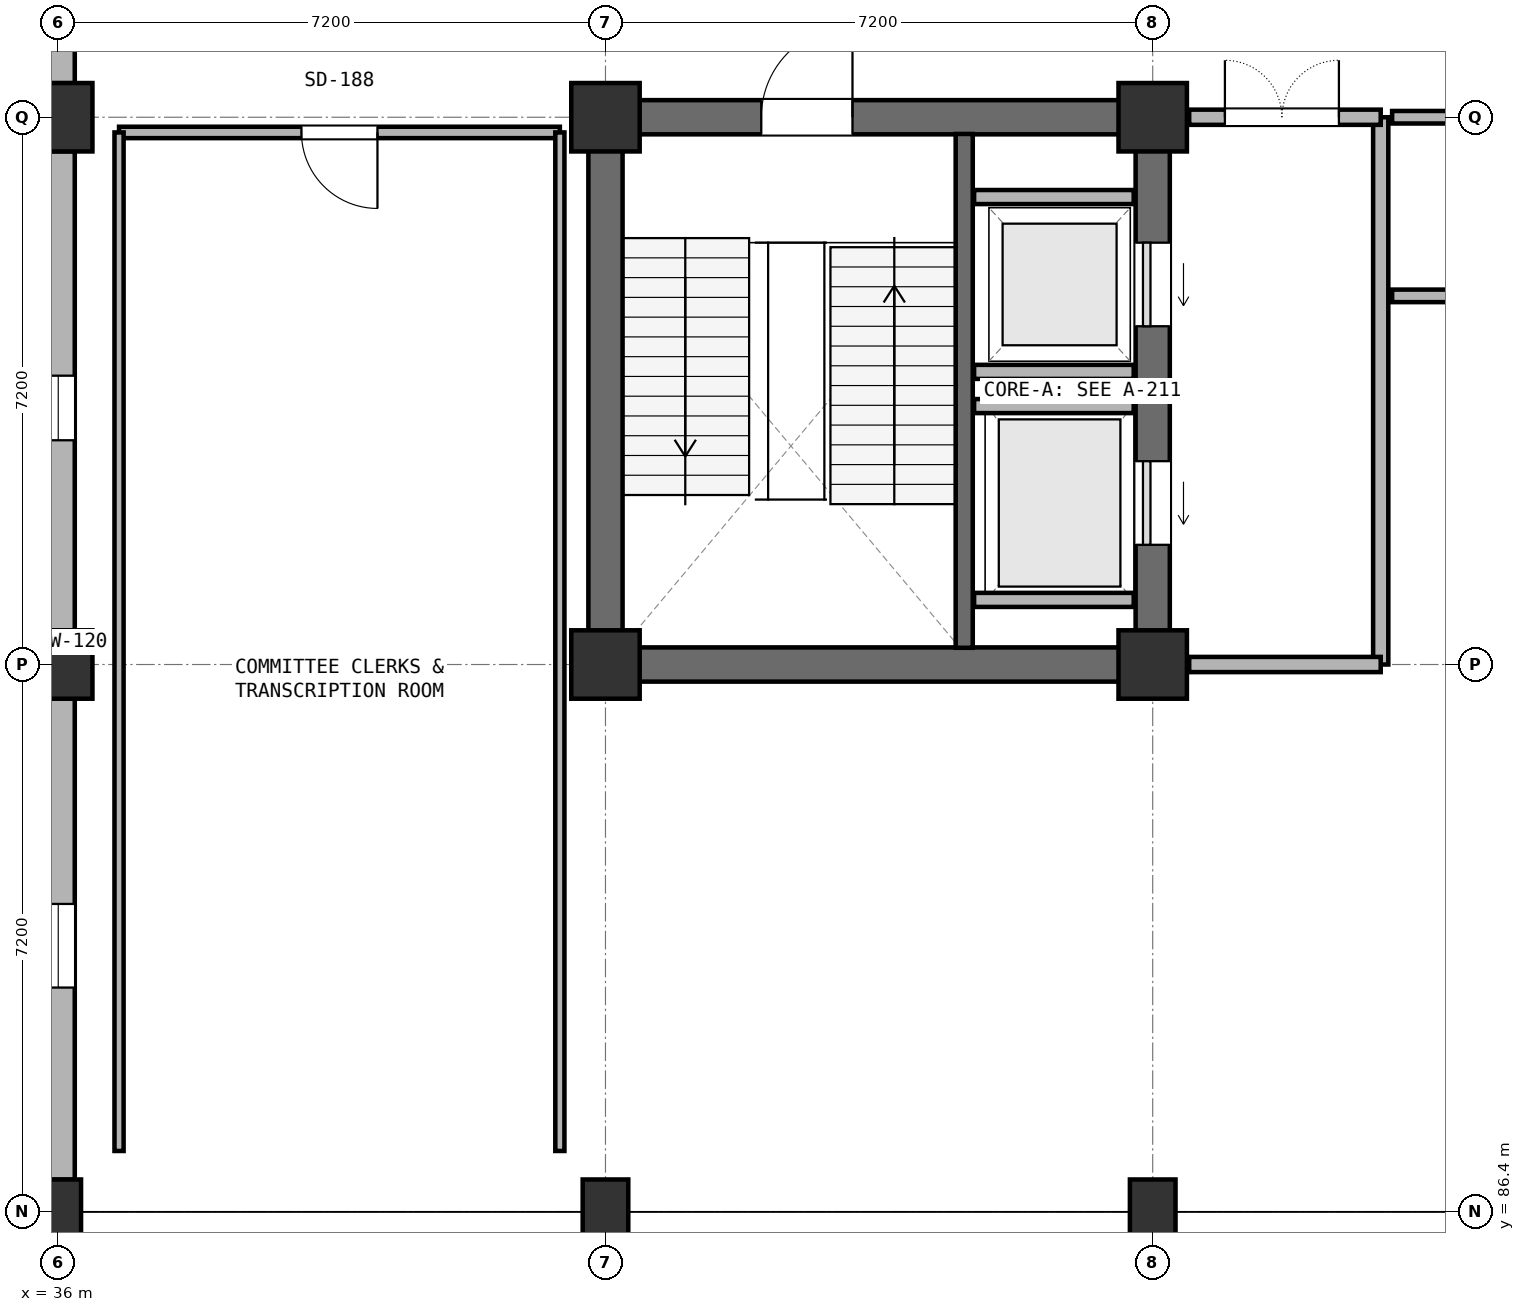
"""IFC4 building model, lengths in metres.
Left out: names, types, materials, properties, quantities, classifications, styles, units other than length and angle.
Written with IfcOpenShell. Run it as: python <this file> out.ifc"""

import sys

from ifc_helpers import new_model, si_unit, direction, frame, frame_2d, origin, origin_2d, place, context, subcontext, project, spatial, rectangle, extrude, element, fill, save


model = new_model("IFC4")
c1 = context("Model", 3, precision=1e-05, world=origin(), true_north=direction((0.0, 1.0)))
c2 = subcontext(c1, "Body", "Model", "MODEL_VIEW")
j1 = project(units=[si_unit("LENGTHUNIT", "METRE"), si_unit("PLANEANGLEUNIT", "RADIAN")], contexts=[c1])
p1 = place(None, origin())
s1 = spatial("IfcSite", under=j1, at=p1, CompositionType="ELEMENT")
p2 = place(p1, origin())
s2 = spatial("IfcBuilding", under=s1, at=p2, CompositionType="ELEMENT")
p3 = place(p2, frame((0.0, 0.0, 5.4)))
s3 = spatial("IfcBuildingStorey", under=s2, at=p3, CompositionType="ELEMENT", Elevation=5.4)
p4 = place(p3, frame((36.0, 86.4, 0.0), z_axis=(0.0, 0.0, 1.0), x_axis=(1.0, 0.0, 0.0)))
e1 = element("IfcColumn", 1, at=p4, inside=s3, PredefinedType="COLUMN", context=c2, shape_type="SweptSolid", body=[
    extrude(rectangle(XDim=0.6, YDim=0.85, at=origin_2d()), origin(), (0.0, 0.0, 1.0), 4.8),
])
for number, where, z_axis, x_axis in (
    (2, (36.0, 93.6, 0.0), (0.0, 0.0, 1.0), (1.0, 0.0, 0.0)),
    (3, (36.0, 100.8, 0.0), (0.0, 0.0, 1.0), (1.0, 0.0, 0.0)),
):
    element("IfcColumn", number, at=place(p3, frame(where, z_axis=z_axis, x_axis=x_axis)), inside=s3, PredefinedType="COLUMN", context=c2, shape_type="SweptSolid", body=[
        extrude(rectangle(XDim=0.9, YDim=0.9, at=origin_2d()), origin(), (0.0, 0.0, 1.0), 4.8),
    ])
p5 = place(p3, frame((43.2, 86.4, 0.0), z_axis=(0.0, 0.0, 1.0), x_axis=(1.0, 0.0, 0.0)))
e4 = element("IfcColumn", 4, at=p5, inside=s3, PredefinedType="COLUMN", context=c2, shape_type="SweptSolid", body=[
    extrude(rectangle(XDim=0.6, YDim=0.85, at=origin_2d()), origin(), (0.0, 0.0, 1.0), 4.8),
])
for number, where, z_axis, x_axis in (
    (5, (43.2, 93.6, 0.0), (0.0, 0.0, 1.0), (1.0, 0.0, 0.0)),
    (6, (43.2, 100.8, 0.0), (0.0, 0.0, 1.0), (1.0, 0.0, 0.0)),
):
    element("IfcColumn", number, at=place(p3, frame(where, z_axis=z_axis, x_axis=x_axis)), inside=s3, PredefinedType="COLUMN", context=c2, shape_type="SweptSolid", body=[
        extrude(rectangle(XDim=0.9, YDim=0.9, at=origin_2d()), origin(), (0.0, 0.0, 1.0), 4.8),
    ])
p6 = place(p3, frame((50.4, 86.4, 0.0), z_axis=(0.0, 0.0, 1.0), x_axis=(1.0, 0.0, 0.0)))
e7 = element("IfcColumn", 7, at=p6, inside=s3, PredefinedType="COLUMN", context=c2, shape_type="SweptSolid", body=[
    extrude(rectangle(XDim=0.6, YDim=0.85, at=origin_2d()), origin(), (0.0, 0.0, 1.0), 4.8),
])
for number, where, z_axis, x_axis in (
    (8, (50.4, 93.6, 0.0), (0.0, 0.0, 1.0), (1.0, 0.0, 0.0)),
    (9, (50.4, 100.8, 0.0), (0.0, 0.0, 1.0), (1.0, 0.0, 0.0)),
):
    element("IfcColumn", number, at=place(p3, frame(where, z_axis=z_axis, x_axis=x_axis)), inside=s3, PredefinedType="COLUMN", context=c2, shape_type="SweptSolid", body=[
        extrude(rectangle(XDim=0.9, YDim=0.9, at=origin_2d()), origin(), (0.0, 0.0, 1.0), 4.8),
    ])
p7 = place(p3, frame((43.55, 93.6, 0.0), z_axis=(0.0, 0.0, 1.0), x_axis=(1.0, 0.0, 0.0)))
e10 = element("IfcWall", 10, at=p7, inside=s3, PredefinedType="SHEAR", context=c2, shape_type="SweptSolid", body=[
    extrude(rectangle(XDim=6.5, YDim=0.45, at=frame_2d((3.25, 0.0))), origin(), (0.0, 0.0, 1.0), 4.8),
])
p8 = place(p3, frame((50.4, 93.95, 0.0), z_axis=(0.0, 0.0, 1.0), x_axis=(0.0, 1.0, 0.0)))
e11 = element("IfcWall", 11, at=p8, inside=s3, PredefinedType="SHEAR", context=c2, shape_type="SweptSolid", body=[
    extrude(rectangle(XDim=6.5, YDim=0.45, at=frame_2d((3.25, 0.0))), origin(), (0.0, 0.0, 1.0), 4.8),
])
p9 = place(p8, frame((1.225, 0.0, 0.0)))
e12 = element("IfcOpeningElement", 12, at=p9, cuts=e11, PredefinedType="OPENING", context=c2, shape_type="SweptSolid", body=[
    extrude(rectangle(XDim=1.1, YDim=2.2, at=frame_2d((0.55, 1.1))), frame((0.0, 0.235, 0.0), z_axis=(0.0, -1.0, 0.0), x_axis=(1.0, 0.0, 0.0)), (0.0, 0.0, 1.0), 0.47),
])
p10 = place(p8, frame((4.1, 0.0, 0.0)))
e13 = element("IfcOpeningElement", 13, at=p10, cuts=e11, PredefinedType="OPENING", context=c2, shape_type="SweptSolid", body=[
    extrude(rectangle(XDim=1.1, YDim=2.2, at=frame_2d((0.55, 1.1))), frame((0.0, 0.235, 0.0), z_axis=(0.0, -1.0, 0.0), x_axis=(1.0, 0.0, 0.0)), (0.0, 0.0, 1.0), 0.47),
])
p11 = place(p3, frame((50.05, 100.8, 0.0), z_axis=(0.0, 0.0, 1.0), x_axis=(-1.0, 0.0, 0.0)))
e14 = element("IfcWall", 14, at=p11, inside=s3, PredefinedType="SHEAR", context=c2, shape_type="SweptSolid", body=[
    extrude(rectangle(XDim=6.5, YDim=0.45, at=frame_2d((3.25, 0.0))), origin(), (0.0, 0.0, 1.0), 4.8),
])
p12 = place(p11, frame((3.6, 0.0, 0.0)))
e15 = element("IfcOpeningElement", 15, at=p12, cuts=e14, PredefinedType="OPENING", context=c2, shape_type="SweptSolid", body=[
    extrude(rectangle(XDim=1.2, YDim=2.2, at=frame_2d((0.6, 1.1))), frame((0.0, 0.235, 0.0), z_axis=(0.0, -1.0, 0.0), x_axis=(1.0, 0.0, 0.0)), (0.0, 0.0, 1.0), 0.47),
])
p13 = place(p3, frame((43.2, 100.45, 0.0), z_axis=(0.0, 0.0, 1.0), x_axis=(0.0, -1.0, 0.0)))
e16 = element("IfcWall", 16, at=p13, inside=s3, PredefinedType="SHEAR", context=c2, shape_type="SweptSolid", body=[
    extrude(rectangle(XDim=6.5, YDim=0.45, at=frame_2d((3.25, 0.0))), origin(), (0.0, 0.0, 1.0), 4.8),
])
p14 = place(p3, frame((47.92, 93.82, 0.0), z_axis=(0.0, 0.0, 1.0), x_axis=(0.0, 1.0, 0.0)))
e17 = element("IfcWall", 17, at=p14, inside=s3, PredefinedType="SHEAR", context=c2, shape_type="SweptSolid", body=[
    extrude(rectangle(XDim=6.76, YDim=0.225, at=frame_2d((3.38, 0.0))), origin(), (0.0, 0.0, 1.0), 4.8),
])
for number, where, z_axis, x_axis in (
    (18, (48.05, 94.45, 0.0), (0.0, 0.0, 1.0), (1.0, 0.0, 0.0)),
    (19, (48.05, 97.0, 0.0), (0.0, 0.0, 1.0), (1.0, 0.0, 0.0)),
    (20, (48.05, 97.45, 0.0), (0.0, 0.0, 1.0), (1.0, 0.0, 0.0)),
    (21, (48.05, 99.75, 0.0), (0.0, 0.0, 1.0), (1.0, 0.0, 0.0)),
):
    element("IfcWall", number, at=place(p3, frame(where, z_axis=z_axis, x_axis=x_axis)), inside=s3, PredefinedType="PARTITIONING", context=c2, shape_type="SweptSolid", body=[
        extrude(rectangle(XDim=2.1, YDim=0.185, at=frame_2d((1.05, 0.0))), origin(), (0.0, 0.0, 1.0), 4.8),
    ])
p15 = place(p3, frame((36.0, 86.823, 0.0), z_axis=(0.0, 0.0, 1.0), x_axis=(0.0, 1.0, 0.0)))
e22 = element("IfcWall", 22, at=p15, inside=s3, PredefinedType="SOLIDWALL", context=c2, shape_type="SweptSolid", body=[
    extrude(rectangle(XDim=6.329, YDim=0.435, at=frame_2d((3.165, 0.0))), origin(), (0.0, 0.0, 1.0), 3.5),
])
p16 = place(p15, frame((2.527, 0.0, 0.7)))
e23 = element("IfcOpeningElement", 23, at=p16, cuts=e22, PredefinedType="OPENING", context=c2, shape_type="SweptSolid", body=[
    extrude(rectangle(XDim=1.1, YDim=2.35, at=frame_2d((0.55, 1.175))), frame((0.0, 0.228, 0.0), z_axis=(0.0, -1.0, 0.0), x_axis=(1.0, 0.0, 0.0)), (0.0, 0.0, 1.0), 0.455),
])
p17 = place(p3, frame((36.0, 94.048, 0.0), z_axis=(0.0, 0.0, 1.0), x_axis=(0.0, 1.0, 0.0)))
e24 = element("IfcWall", 24, at=p17, inside=s3, PredefinedType="SOLIDWALL", context=c2, shape_type="SweptSolid", body=[
    extrude(rectangle(XDim=6.304, YDim=0.435, at=frame_2d((3.152, 0.0))), origin(), (0.0, 0.0, 1.0), 3.5),
])
p18 = place(p17, frame((2.502, 0.0, 0.7)))
e25 = element("IfcOpeningElement", 25, at=p18, cuts=e24, PredefinedType="OPENING", context=c2, shape_type="SweptSolid", body=[
    extrude(rectangle(XDim=0.85, YDim=2.2, at=frame_2d((0.425, 1.1))), frame((0.0, 0.228, 0.0), z_axis=(0.0, -1.0, 0.0), x_axis=(1.0, 0.0, 0.0)), (0.0, 0.0, 1.0), 0.455),
])
p19 = place(p3, frame((36.0, 101.248, 0.0), z_axis=(0.0, 0.0, 1.0), x_axis=(0.0, 1.0, 0.0)))
e26 = element("IfcWall", 26, at=p19, inside=s3, PredefinedType="SOLIDWALL", context=c2, shape_type="SweptSolid", body=[
    extrude(rectangle(XDim=6.304, YDim=0.435, at=frame_2d((3.152, 0.0))), origin(), (0.0, 0.0, 1.0), 3.5),
])
p20 = place(p19, frame((2.502, 0.0, 0.7)))
e27 = element("IfcOpeningElement", 27, at=p20, cuts=e26, PredefinedType="OPENING", context=c2, shape_type="SweptSolid", body=[
    extrude(rectangle(XDim=1.1, YDim=2.35, at=frame_2d((0.55, 1.175))), frame((0.0, 0.228, 0.0), z_axis=(0.0, -1.0, 0.0), x_axis=(1.0, 0.0, 0.0)), (0.0, 0.0, 1.0), 0.455),
])
p21 = place(p3, frame((53.4, 93.6, 0.0), z_axis=(0.0, 0.0, 1.0), x_axis=(0.0, 1.0, 0.0)))
e28 = element("IfcWall", 28, at=p21, inside=s3, PredefinedType="PARTITIONING", context=c2, shape_type="SweptSolid", body=[
    extrude(rectangle(XDim=7.2, YDim=0.2, at=frame_2d((3.6, 0.0))), origin(), (0.0, 0.0, 1.0), 3.52),
])
p22 = place(p3, frame((50.88, 93.6, 0.0), z_axis=(0.0, 0.0, 1.0), x_axis=(1.0, 0.0, 0.0)))
e29 = element("IfcWall", 29, at=p22, inside=s3, PredefinedType="PARTITIONING", context=c2, shape_type="SweptSolid", body=[
    extrude(rectangle(XDim=2.52, YDim=0.2, at=frame_2d((1.26, 0.0))), origin(), (0.0, 0.0, 1.0), 3.52),
])
p23 = place(p3, frame((53.4, 100.8, 0.0), z_axis=(0.0, 0.0, 1.0), x_axis=(-1.0, 0.0, 0.0)))
e30 = element("IfcWall", 30, at=p23, inside=s3, PredefinedType="PARTITIONING", context=c2, shape_type="SweptSolid", body=[
    extrude(rectangle(XDim=2.52, YDim=0.2, at=frame_2d((1.26, 0.0))), origin(), (0.0, 0.0, 1.0), 3.52),
])
p24 = place(p23, frame((0.55, 0.0, 0.0)))
e31 = element("IfcOpeningElement", 31, at=p24, cuts=e30, PredefinedType="OPENING", context=c2, shape_type="SweptSolid", body=[
    extrude(rectangle(XDim=1.5, YDim=2.2, at=frame_2d((0.75, 1.1))), frame((0.0, 0.11, 0.0), z_axis=(0.0, -1.0, 0.0), x_axis=(1.0, 0.0, 0.0)), (0.0, 0.0, 1.0), 0.22),
])
p25 = place(p3, frame((56.75, 100.8, 0.0), z_axis=(0.0, 0.0, 1.0), x_axis=(-1.0, 0.0, 0.0)))
e32 = element("IfcWall", 32, at=p25, inside=s3, PredefinedType="PARTITIONING", context=c2, shape_type="SweptSolid", body=[
    extrude(rectangle(XDim=3.2, YDim=0.165, at=frame_2d((1.6, 0.0))), origin(), (0.0, 0.0, 1.0), 3.52),
])
p26 = place(p25, frame((0.95, 0.0, 0.0)))
e33 = element("IfcOpeningElement", 33, at=p26, cuts=e32, PredefinedType="OPENING", context=c2, shape_type="SweptSolid", body=[
    extrude(rectangle(XDim=0.95, YDim=2.15, at=frame_2d((0.475, 1.075))), frame((0.0, 0.093, 0.0), z_axis=(0.0, -1.0, 0.0), x_axis=(1.0, 0.0, 0.0)), (0.0, 0.0, 1.0), 0.185),
])
p27 = place(p3, frame((53.55, 98.45, 0.0), z_axis=(0.0, 0.0, 1.0), x_axis=(1.0, 0.0, 0.0)))
e34 = element("IfcWall", 34, at=p27, inside=s3, PredefinedType="PARTITIONING", context=c2, shape_type="SweptSolid", body=[
    extrude(rectangle(XDim=3.2, YDim=0.165, at=frame_2d((1.6, 0.0))), origin(), (0.0, 0.0, 1.0), 3.52),
])
p28 = place(p3, frame((42.6, 100.6, 0.0), z_axis=(0.0, 0.0, 1.0), x_axis=(-1.0, 0.0, 0.0)))
e35 = element("IfcWall", 35, at=p28, inside=s3, PredefinedType="PARTITIONING", context=c2, shape_type="SweptSolid", body=[
    extrude(rectangle(XDim=5.8, YDim=0.15, at=frame_2d((2.9, 0.0))), origin(), (0.0, 0.0, 1.0), 3.52),
])
p29 = place(p28, frame((2.4, 0.0, 0.0)))
e36 = element("IfcOpeningElement", 36, at=p29, cuts=e35, PredefinedType="OPENING", context=c2, shape_type="SweptSolid", body=[
    extrude(rectangle(XDim=1.0, YDim=2.15, at=frame_2d((0.5, 1.075))), frame((0.0, 0.085, 0.0), z_axis=(0.0, -1.0, 0.0), x_axis=(1.0, 0.0, 0.0)), (0.0, 0.0, 1.0), 0.17),
])
for number, where, z_axis, x_axis in (
    (37, (36.8, 87.2, 0.0), (0.0, 0.0, 1.0), (0.0, 1.0, 0.0)),
    (38, (42.6, 100.6, 0.0), (0.0, 0.0, 1.0), (0.0, -1.0, 0.0)),
):
    element("IfcWall", number, at=place(p3, frame(where, z_axis=z_axis, x_axis=x_axis)), inside=s3, PredefinedType="PARTITIONING", context=c2, shape_type="SweptSolid", body=[
        extrude(rectangle(XDim=13.4, YDim=0.12, at=frame_2d((6.7, 0.0))), origin(), (0.0, 0.0, 1.0), 3.52),
    ])
p30 = place(p9, origin())
e39 = element("IfcDoor", 39, at=p30, inside=s3, OperationType="SLIDING_TO_LEFT", PredefinedType="DOOR", context=c2, shape_type="SweptSolid", body=[
    extrude(rectangle(XDim=1.1, YDim=2.2, at=frame_2d((0.55, 1.1))), frame((0.0, 0.025, 0.0), z_axis=(0.0, -1.0, 0.0), x_axis=(1.0, 0.0, 0.0)), (0.0, 0.0, 1.0), 0.05),
])
fill(e12, e39)
p31 = place(p10, origin())
e40 = element("IfcDoor", 40, at=p31, inside=s3, OperationType="SLIDING_TO_LEFT", PredefinedType="DOOR", context=c2, shape_type="SweptSolid", body=[
    extrude(rectangle(XDim=1.1, YDim=2.2, at=frame_2d((0.55, 1.1))), frame((0.0, 0.025, 0.0), z_axis=(0.0, -1.0, 0.0), x_axis=(1.0, 0.0, 0.0)), (0.0, 0.0, 1.0), 0.05),
])
fill(e13, e40)
p32 = place(p16, origin())
e41 = element("IfcWindow", 41, at=p32, inside=s3, PartitioningType="SINGLE_PANEL", PredefinedType="WINDOW", context=c2, shape_type="SweptSolid", body=[
    extrude(rectangle(XDim=1.1, YDim=2.35, at=frame_2d((0.55, 1.175))), frame((0.0, 0.03, 0.0), z_axis=(0.0, -1.0, 0.0), x_axis=(1.0, 0.0, 0.0)), (0.0, 0.0, 1.0), 0.06),
])
fill(e23, e41)
p33 = place(p18, origin())
e42 = element("IfcWindow", 42, at=p33, inside=s3, PartitioningType="SINGLE_PANEL", PredefinedType="WINDOW", context=c2, shape_type="SweptSolid", body=[
    extrude(rectangle(XDim=0.85, YDim=2.2, at=frame_2d((0.425, 1.1))), frame((0.0, 0.03, 0.0), z_axis=(0.0, -1.0, 0.0), x_axis=(1.0, 0.0, 0.0)), (0.0, 0.0, 1.0), 0.06),
])
fill(e25, e42)
p34 = place(p12, frame((1.2, 0.0, 0.0), z_axis=(0.0, 0.0, 1.0), x_axis=(-1.0, 0.0, 0.0)))
e43 = element("IfcDoor", 43, at=p34, inside=s3, OperationType="SINGLE_SWING_RIGHT", PredefinedType="DOOR", context=c2, shape_type="SweptSolid", body=[
    extrude(rectangle(XDim=1.2, YDim=2.2, at=frame_2d((0.6, 1.1))), frame((0.0, 0.025, 0.0), z_axis=(0.0, -1.0, 0.0), x_axis=(1.0, 0.0, 0.0)), (0.0, 0.0, 1.0), 0.05),
])
fill(e15, e43)
p35 = place(p24, frame((1.5, 0.0, 0.0), z_axis=(0.0, 0.0, 1.0), x_axis=(-1.0, 0.0, 0.0)))
e44 = element("IfcDoor", 44, at=p35, inside=s3, OperationType="DOUBLE_DOOR_SINGLE_SWING", PredefinedType="DOOR", context=c2, shape_type="SweptSolid", body=[
    extrude(rectangle(XDim=1.5, YDim=2.2, at=frame_2d((0.75, 1.1))), frame((0.0, 0.025, 0.0), z_axis=(0.0, -1.0, 0.0), x_axis=(1.0, 0.0, 0.0)), (0.0, 0.0, 1.0), 0.05),
])
fill(e31, e44)
p36 = place(p29, origin())
e45 = element("IfcDoor", 45, at=p36, inside=s3, OperationType="SINGLE_SWING_LEFT", PredefinedType="DOOR", context=c2, shape_type="SweptSolid", body=[
    extrude(rectangle(XDim=1.0, YDim=2.15, at=frame_2d((0.5, 1.075))), frame((0.0, 0.025, 0.0), z_axis=(0.0, -1.0, 0.0), x_axis=(1.0, 0.0, 0.0)), (0.0, 0.0, 1.0), 0.05),
])
fill(e36, e45)
save(model, sys.argv[1])
